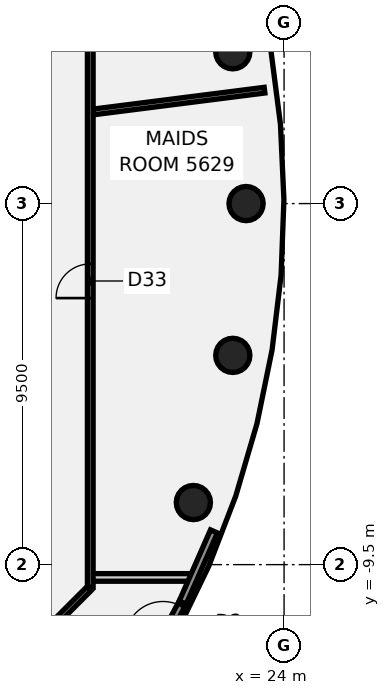
"""IFC4 building model, lengths in metres.
Left out: names, types, materials, properties, quantities, classifications, styles, units other than length and angle.
Written with IfcOpenShell. Run it as: python <this file> out.ifc"""

import sys

from ifc_helpers import new_model, si_unit, direction, frame, frame_2d, origin, origin_2d, place, context, subcontext, project, spatial, rectangle, circle, extrude, element, fill, save


model = new_model("IFC4")
c1 = context("Model", 3, precision=1e-05, world=origin(), true_north=direction((0.0, 1.0)))
c2 = subcontext(c1, "Body", "Model", "MODEL_VIEW")
j1 = project(units=[si_unit("LENGTHUNIT", "METRE"), si_unit("PLANEANGLEUNIT", "RADIAN")], contexts=[c1])
p1 = place(None, origin())
s1 = spatial("IfcSite", under=j1, at=p1, CompositionType="ELEMENT")
p2 = place(p1, origin())
s2 = spatial("IfcBuilding", under=s1, at=p2, CompositionType="ELEMENT")
p3 = place(p2, frame((0.0, 0.0, 223.5)))
s3 = spatial("IfcBuildingStorey", under=s2, at=p3, CompositionType="ELEMENT", Elevation=223.5)
for number, where, z_axis, x_axis in (
    (1, (23.0, 0.0, -0.14), (0.0, 0.0, 1.0), (1.0, 0.0, 0.0)),
    (2, (22.651, 3.994, -0.14), (0.0, 0.0, 1.0), (1.0, 0.0, 0.0)),
    (3, (21.613, -7.866, -0.14), (0.0, 0.0, 1.0), (1.0, 0.0, 0.0)),
    (4, (22.651, -3.994, -0.14), (0.0, 0.0, 1.0), (1.0, 0.0, 0.0)),
):
    element("IfcColumn", number, at=place(p3, frame(where, z_axis=z_axis, x_axis=x_axis)), inside=s3, PredefinedType="COLUMN", context=c2, shape_type="SweptSolid", body=[
        extrude(circle(Radius=0.45, at=origin_2d()), origin(), (0.0, 0.0, 1.0), 3.6),
    ])
p4 = place(p3, frame((18.955, -9.837, 0.0), z_axis=(0.0, 0.0, 1.0), x_axis=(1.0, 0.0, 0.0)))
e5 = element("IfcWall", 5, at=p4, inside=s3, PredefinedType="PARTITIONING", context=c2, shape_type="SweptSolid", body=[
    extrude(rectangle(XDim=2.585, YDim=0.2, at=frame_2d((1.292, 0.0))), origin(), (0.0, 0.0, 1.0), 2.864),
])
p5 = place(p3, frame((18.965, 2.409, 0.0), z_axis=(0.0, 0.0, 1.0), x_axis=(0.992016930674, 0.126104755093, 0.0)))
e6 = element("IfcWall", 6, at=p5, inside=s3, PredefinedType="PARTITIONING", context=c2, shape_type="SweptSolid", body=[
    extrude(rectangle(XDim=4.557, YDim=0.15, at=frame_2d((2.279, 0.0))), origin(), (0.0, 0.0, 1.0), 2.864),
])
p6 = place(p3, frame((17.1, -11.9, 0.0), z_axis=(0.0, 0.0, 1.0), x_axis=(0.707106781187, 0.707106781187, 0.0)))
e7 = element("IfcWall", 7, at=p6, inside=s3, PredefinedType="PARTITIONING", context=c2, shape_type="SweptSolid", body=[
    extrude(rectangle(XDim=2.505, YDim=0.15, at=frame_2d((1.253, 0.0))), origin(), (0.0, 0.0, 1.0), 2.864),
])
p7 = place(p3, frame((18.9, -10.1, 0.0), z_axis=(0.0, 0.0, 1.0), x_axis=(0.0, 1.0, 0.0)))
e8 = element("IfcWall", 8, at=p7, inside=s3, PredefinedType="PARTITIONING", context=c2, shape_type="SweptSolid", body=[
    extrude(rectangle(XDim=20.2, YDim=0.15, at=frame_2d((10.1, 0.0))), origin(), (0.0, 0.0, 1.0), 2.864),
])
p8 = place(p7, frame((7.613, 0.0, 0.0)))
e9 = element("IfcOpeningElement", 9, at=p8, cuts=e8, PredefinedType="OPENING", context=c2, shape_type="SweptSolid", body=[
    extrude(rectangle(XDim=0.9, YDim=2.1, at=frame_2d((0.45, 1.05))), frame((0.0, 0.085, 0.0), z_axis=(0.0, -1.0, 0.0), x_axis=(1.0, 0.0, 0.0)), (0.0, 0.0, 1.0), 0.17),
])
p9 = place(p3, frame((21.331, -10.501, 0.0), z_axis=(0.0, 0.0, 1.0), x_axis=(0.402431086407, 0.915450283026, 0.0)))
e10 = element("IfcWall", 10, at=p9, inside=s3, PredefinedType="SOLIDWALL", context=c2, shape_type="SweptSolid", body=[
    extrude(rectangle(XDim=2.049, YDim=0.2, at=frame_2d((1.024, 0.0))), origin(), (0.0, 0.0, 1.0), 3.46),
])
p10 = place(p3, frame((20.578, -11.911, 0.0), z_axis=(0.0, 0.0, 1.0), x_axis=(0.471483774062, 0.881874736454, 0.0)))
e11 = element("IfcWall", 11, at=p10, inside=s3, PredefinedType="SOLIDWALL", context=c2, shape_type="SweptSolid", body=[
    extrude(rectangle(XDim=1.598, YDim=0.2, at=frame_2d((0.799, 0.0))), origin(), (0.0, 0.0, 1.0), 3.46),
])
p11 = place(p10, frame((0.5, 0.0, 0.0)))
e12 = element("IfcOpeningElement", 12, at=p11, cuts=e11, PredefinedType="OPENING", context=c2, shape_type="SweptSolid", body=[
    extrude(rectangle(XDim=1.0, YDim=2.4, at=frame_2d((0.5, 1.2))), frame((0.0, 0.11, 0.0), z_axis=(0.0, -1.0, 0.0), x_axis=(1.0, 0.0, 0.0)), (0.0, 0.0, 1.0), 0.22),
])
p12 = place(p8, frame((0.9, 0.0, 0.0), z_axis=(0.0, 0.0, 1.0), x_axis=(-1.0, 0.0, 0.0)))
e13 = element("IfcDoor", 13, at=p12, inside=s3, OperationType="SINGLE_SWING_LEFT", PredefinedType="DOOR", context=c2, shape_type="SweptSolid", body=[
    extrude(rectangle(XDim=0.9, YDim=2.1, at=frame_2d((0.45, 1.05))), frame((0.0, 0.025, 0.0), z_axis=(0.0, -1.0, 0.0), x_axis=(1.0, 0.0, 0.0)), (0.0, 0.0, 1.0), 0.05),
])
fill(e9, e13)
p13 = place(p11, origin())
e14 = element("IfcDoor", 14, at=p13, inside=s3, OperationType="SINGLE_SWING_LEFT", PredefinedType="DOOR", context=c2, shape_type="SweptSolid", body=[
    extrude(rectangle(XDim=1.0, YDim=2.4, at=frame_2d((0.5, 1.2))), frame((0.0, 0.025, 0.0), z_axis=(0.0, -1.0, 0.0), x_axis=(1.0, 0.0, 0.0)), (0.0, 0.0, 1.0), 0.05),
])
fill(e12, e14)
save(model, sys.argv[1])
